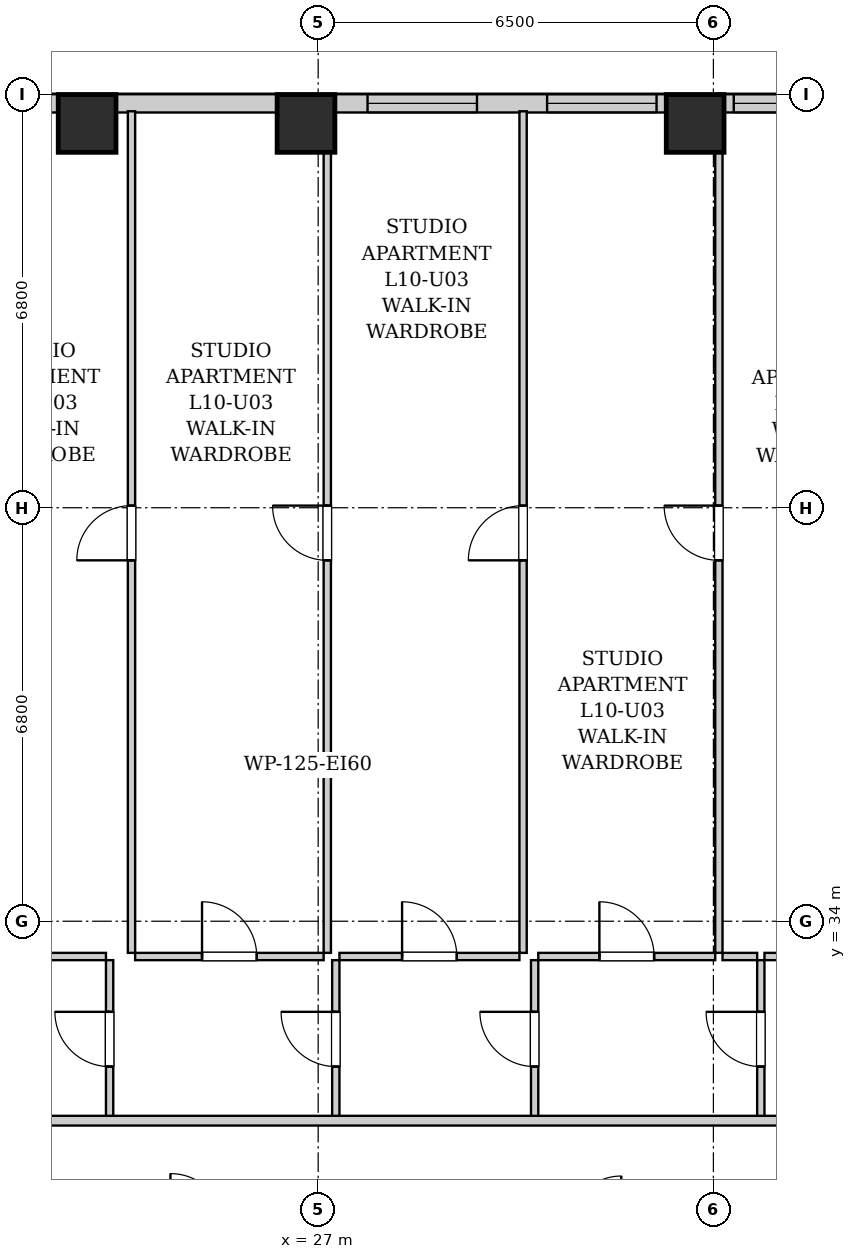
"""IFC4 building model, lengths in metres.
Left out: names, types, materials, properties, quantities, classifications, styles, units other than length and angle.
Written with IfcOpenShell. Run it as: python <this file> out.ifc"""

import sys

from ifc_helpers import new_model, si_unit, direction, frame, frame_2d, origin, origin_2d, place, context, subcontext, project, spatial, rectangle, extrude, element, fill, save


model = new_model("IFC4")
c1 = context("Model", 3, precision=1e-05, world=origin(), true_north=direction((0.0, 1.0)))
c2 = subcontext(c1, "Body", "Model", "MODEL_VIEW")
j1 = project(units=[si_unit("LENGTHUNIT", "METRE"), si_unit("PLANEANGLEUNIT", "RADIAN")], contexts=[c1])
p1 = place(None, origin())
s1 = spatial("IfcSite", under=j1, at=p1, CompositionType="ELEMENT")
p2 = place(p1, origin())
s2 = spatial("IfcBuilding", under=s1, at=p2, CompositionType="ELEMENT")
p3 = place(p2, frame((0.0, 0.0, 41.8)))
s3 = spatial("IfcBuildingStorey", under=s2, at=p3, CompositionType="ELEMENT", Elevation=41.8)
for number, where, z_axis, x_axis in (
    (1, (23.2, 47.12, 0.0), (0.0, 0.0, 1.0), (1.0, 0.0, 0.0)),
    (2, (26.8, 47.12, 0.0), (0.0, 0.0, 1.0), (1.0, 0.0, 0.0)),
    (3, (33.2, 47.12, 0.0), (0.0, 0.0, 1.0), (1.0, 0.0, 0.0)),
):
    element("IfcColumn", number, at=place(p3, frame(where, z_axis=z_axis, x_axis=x_axis)), inside=s3, PredefinedType="COLUMN", context=c2, shape_type="SweptSolid", body=[
        extrude(rectangle(XDim=0.95, YDim=0.95, at=origin_2d()), origin(), (0.0, 0.0, 1.0), 3.2),
    ])
p4 = place(p3, frame((10.0, 47.45, 0.0), z_axis=(0.0, 0.0, 1.0), x_axis=(1.0, 0.0, 0.0)))
e4 = element("IfcWall", 4, at=p4, inside=s3, PredefinedType="SOLIDWALL", context=c2, shape_type="SweptSolid", body=[
    extrude(rectangle(XDim=25.7, YDim=0.3, at=frame_2d((12.85, 0.0))), origin(), (0.0, 0.0, 1.0), 1.975),
])
p5 = place(p4, frame((1.73, 0.0, 0.55)))
e5 = element("IfcOpeningElement", 5, at=p5, cuts=e4, PredefinedType="OPENING", context=c2, shape_type="SweptSolid", body=[
    extrude(rectangle(XDim=1.8, YDim=1.2, at=frame_2d((0.9, 0.6))), frame((0.0, 0.16, 0.0), z_axis=(0.0, -1.0, 0.0), x_axis=(1.0, 0.0, 0.0)), (0.0, 0.0, 1.0), 0.32),
])
p6 = place(p4, frame((4.961, 0.0, 0.55)))
e6 = element("IfcOpeningElement", 6, at=p6, cuts=e4, PredefinedType="OPENING", context=c2, shape_type="SweptSolid", body=[
    extrude(rectangle(XDim=1.8, YDim=1.2, at=frame_2d((0.9, 0.6))), frame((0.0, 0.16, 0.0), z_axis=(0.0, -1.0, 0.0), x_axis=(1.0, 0.0, 0.0)), (0.0, 0.0, 1.0), 0.32),
])
p7 = place(p4, frame((8.435, 0.0, 0.55)))
e7 = element("IfcOpeningElement", 7, at=p7, cuts=e4, PredefinedType="OPENING", context=c2, shape_type="SweptSolid", body=[
    extrude(rectangle(XDim=1.8, YDim=1.2, at=frame_2d((0.9, 0.6))), frame((0.0, 0.16, 0.0), z_axis=(0.0, -1.0, 0.0), x_axis=(1.0, 0.0, 0.0)), (0.0, 0.0, 1.0), 0.32),
])
p8 = place(p4, frame((11.15, 0.0, 0.55)))
e8 = element("IfcOpeningElement", 8, at=p8, cuts=e4, PredefinedType="OPENING", context=c2, shape_type="SweptSolid", body=[
    extrude(rectangle(XDim=1.35, YDim=1.2, at=frame_2d((0.675, 0.6))), frame((0.0, 0.16, 0.0), z_axis=(0.0, -1.0, 0.0), x_axis=(1.0, 0.0, 0.0)), (0.0, 0.0, 1.0), 0.32),
])
p9 = place(p4, frame((17.812, 0.0, 0.55)))
e9 = element("IfcOpeningElement", 9, at=p9, cuts=e4, PredefinedType="OPENING", context=c2, shape_type="SweptSolid", body=[
    extrude(rectangle(XDim=1.8, YDim=1.2, at=frame_2d((0.9, 0.6))), frame((0.0, 0.16, 0.0), z_axis=(0.0, -1.0, 0.0), x_axis=(1.0, 0.0, 0.0)), (0.0, 0.0, 1.0), 0.32),
])
p10 = place(p4, frame((20.765, 0.0, 0.55)))
e10 = element("IfcOpeningElement", 10, at=p10, cuts=e4, PredefinedType="OPENING", context=c2, shape_type="SweptSolid", body=[
    extrude(rectangle(XDim=1.8, YDim=1.2, at=frame_2d((0.9, 0.6))), frame((0.0, 0.16, 0.0), z_axis=(0.0, -1.0, 0.0), x_axis=(1.0, 0.0, 0.0)), (0.0, 0.0, 1.0), 0.32),
])
p11 = place(p4, frame((23.835, 0.0, 0.55)))
e11 = element("IfcOpeningElement", 11, at=p11, cuts=e4, PredefinedType="OPENING", context=c2, shape_type="SweptSolid", body=[
    extrude(rectangle(XDim=1.35, YDim=1.2, at=frame_2d((0.675, 0.6))), frame((0.0, 0.16, 0.0), z_axis=(0.0, -1.0, 0.0), x_axis=(1.0, 0.0, 0.0)), (0.0, 0.0, 1.0), 0.32),
])
p12 = place(p3, frame((23.57, 30.76, 0.0), z_axis=(0.0, 0.0, 1.0), x_axis=(0.0, 1.0, 0.0)))
e12 = element("IfcWall", 12, at=p12, inside=s3, PredefinedType="PARTITIONING", context=c2, shape_type="SweptSolid", body=[
    extrude(rectangle(XDim=2.6, YDim=0.12, at=frame_2d((1.3, 0.0))), origin(), (0.0, 0.0, 1.0), 2.94),
])
p13 = place(p12, frame((0.85, 0.0, 0.0)))
e13 = element("IfcOpeningElement", 13, at=p13, cuts=e12, PredefinedType="OPENING", context=c2, shape_type="SweptSolid", body=[
    extrude(rectangle(XDim=0.9, YDim=2.05, at=frame_2d((0.45, 1.025))), frame((0.0, 0.07, 0.0), z_axis=(0.0, -1.0, 0.0), x_axis=(1.0, 0.0, 0.0)), (0.0, 0.0, 1.0), 0.14),
])
p14 = place(p3, frame((20.77, 33.42, 0.0), z_axis=(0.0, 0.0, 1.0), x_axis=(1.0, 0.0, 0.0)))
e14 = element("IfcWall", 14, at=p14, inside=s3, PredefinedType="PARTITIONING", context=c2, shape_type="SweptSolid", body=[
    extrude(rectangle(XDim=2.74, YDim=0.12, at=frame_2d((1.37, 0.0))), origin(), (0.0, 0.0, 1.0), 2.94),
])
p15 = place(p14, frame((0.92, 0.0, 0.0)))
e15 = element("IfcOpeningElement", 15, at=p15, cuts=e14, PredefinedType="OPENING", context=c2, shape_type="SweptSolid", body=[
    extrude(rectangle(XDim=0.9, YDim=2.05, at=frame_2d((0.45, 1.025))), frame((0.0, 0.07, 0.0), z_axis=(0.0, -1.0, 0.0), x_axis=(1.0, 0.0, 0.0)), (0.0, 0.0, 1.0), 0.14),
])
p16 = place(p3, frame((27.29, 30.76, 0.0), z_axis=(0.0, 0.0, 1.0), x_axis=(0.0, 1.0, 0.0)))
e16 = element("IfcWall", 16, at=p16, inside=s3, PredefinedType="PARTITIONING", context=c2, shape_type="SweptSolid", body=[
    extrude(rectangle(XDim=2.6, YDim=0.12, at=frame_2d((1.3, 0.0))), origin(), (0.0, 0.0, 1.0), 2.94),
])
p17 = place(p16, frame((0.85, 0.0, 0.0)))
e17 = element("IfcOpeningElement", 17, at=p17, cuts=e16, PredefinedType="OPENING", context=c2, shape_type="SweptSolid", body=[
    extrude(rectangle(XDim=0.9, YDim=2.05, at=frame_2d((0.45, 1.025))), frame((0.0, 0.07, 0.0), z_axis=(0.0, -1.0, 0.0), x_axis=(1.0, 0.0, 0.0)), (0.0, 0.0, 1.0), 0.14),
])
p18 = place(p3, frame((23.99, 33.42, 0.0), z_axis=(0.0, 0.0, 1.0), x_axis=(1.0, 0.0, 0.0)))
e18 = element("IfcWall", 18, at=p18, inside=s3, PredefinedType="PARTITIONING", context=c2, shape_type="SweptSolid", body=[
    extrude(rectangle(XDim=3.1, YDim=0.12, at=frame_2d((1.55, 0.0))), origin(), (0.0, 0.0, 1.0), 2.94),
])
p19 = place(p18, frame((1.1, 0.0, 0.0)))
e19 = element("IfcOpeningElement", 19, at=p19, cuts=e18, PredefinedType="OPENING", context=c2, shape_type="SweptSolid", body=[
    extrude(rectangle(XDim=0.9, YDim=2.05, at=frame_2d((0.45, 1.025))), frame((0.0, 0.07, 0.0), z_axis=(0.0, -1.0, 0.0), x_axis=(1.0, 0.0, 0.0)), (0.0, 0.0, 1.0), 0.14),
])
p20 = place(p3, frame((30.56, 30.76, 0.0), z_axis=(0.0, 0.0, 1.0), x_axis=(0.0, 1.0, 0.0)))
e20 = element("IfcWall", 20, at=p20, inside=s3, PredefinedType="PARTITIONING", context=c2, shape_type="SweptSolid", body=[
    extrude(rectangle(XDim=2.6, YDim=0.12, at=frame_2d((1.3, 0.0))), origin(), (0.0, 0.0, 1.0), 2.94),
])
p21 = place(p20, frame((0.85, 0.0, 0.0)))
e21 = element("IfcOpeningElement", 21, at=p21, cuts=e20, PredefinedType="OPENING", context=c2, shape_type="SweptSolid", body=[
    extrude(rectangle(XDim=0.9, YDim=2.05, at=frame_2d((0.45, 1.025))), frame((0.0, 0.07, 0.0), z_axis=(0.0, -1.0, 0.0), x_axis=(1.0, 0.0, 0.0)), (0.0, 0.0, 1.0), 0.14),
])
p22 = place(p3, frame((27.35, 33.42, 0.0), z_axis=(0.0, 0.0, 1.0), x_axis=(1.0, 0.0, 0.0)))
e22 = element("IfcWall", 22, at=p22, inside=s3, PredefinedType="PARTITIONING", context=c2, shape_type="SweptSolid", body=[
    extrude(rectangle(XDim=2.96, YDim=0.12, at=frame_2d((1.48, 0.0))), origin(), (0.0, 0.0, 1.0), 2.94),
])
p23 = place(p22, frame((1.03, 0.0, 0.0)))
e23 = element("IfcOpeningElement", 23, at=p23, cuts=e22, PredefinedType="OPENING", context=c2, shape_type="SweptSolid", body=[
    extrude(rectangle(XDim=0.9, YDim=2.05, at=frame_2d((0.45, 1.025))), frame((0.0, 0.07, 0.0), z_axis=(0.0, -1.0, 0.0), x_axis=(1.0, 0.0, 0.0)), (0.0, 0.0, 1.0), 0.14),
])
p24 = place(p3, frame((34.28, 30.76, 0.0), z_axis=(0.0, 0.0, 1.0), x_axis=(0.0, 1.0, 0.0)))
e24 = element("IfcWall", 24, at=p24, inside=s3, PredefinedType="PARTITIONING", context=c2, shape_type="SweptSolid", body=[
    extrude(rectangle(XDim=2.6, YDim=0.12, at=frame_2d((1.3, 0.0))), origin(), (0.0, 0.0, 1.0), 2.94),
])
p25 = place(p24, frame((0.85, 0.0, 0.0)))
e25 = element("IfcOpeningElement", 25, at=p25, cuts=e24, PredefinedType="OPENING", context=c2, shape_type="SweptSolid", body=[
    extrude(rectangle(XDim=0.9, YDim=2.05, at=frame_2d((0.45, 1.025))), frame((0.0, 0.07, 0.0), z_axis=(0.0, -1.0, 0.0), x_axis=(1.0, 0.0, 0.0)), (0.0, 0.0, 1.0), 0.14),
])
p26 = place(p3, frame((30.62, 33.42, 0.0), z_axis=(0.0, 0.0, 1.0), x_axis=(1.0, 0.0, 0.0)))
e26 = element("IfcWall", 26, at=p26, inside=s3, PredefinedType="PARTITIONING", context=c2, shape_type="SweptSolid", body=[
    extrude(rectangle(XDim=2.91, YDim=0.12, at=frame_2d((1.455, 0.0))), origin(), (0.0, 0.0, 1.0), 2.94),
])
p27 = place(p26, frame((1.005, 0.0, 0.0)))
e27 = element("IfcOpeningElement", 27, at=p27, cuts=e26, PredefinedType="OPENING", context=c2, shape_type="SweptSolid", body=[
    extrude(rectangle(XDim=0.9, YDim=2.05, at=frame_2d((0.45, 1.025))), frame((0.0, 0.07, 0.0), z_axis=(0.0, -1.0, 0.0), x_axis=(1.0, 0.0, 0.0)), (0.0, 0.0, 1.0), 0.14),
])
p28 = place(p3, frame((33.65, 33.42, 0.0), z_axis=(0.0, 0.0, 1.0), x_axis=(1.0, 0.0, 0.0)))
e28 = element("IfcWall", 28, at=p28, inside=s3, PredefinedType="PARTITIONING", context=c2, shape_type="SweptSolid", body=[
    extrude(rectangle(XDim=0.57, YDim=0.12, at=frame_2d((0.285, 0.0))), origin(), (0.0, 0.0, 1.0), 2.94),
])
p29 = place(p3, frame((34.34, 33.42, 0.0), z_axis=(0.0, 0.0, 1.0), x_axis=(1.0, 0.0, 0.0)))
e29 = element("IfcWall", 29, at=p29, inside=s3, PredefinedType="PARTITIONING", context=c2, shape_type="SweptSolid", body=[
    extrude(rectangle(XDim=2.41, YDim=0.12, at=frame_2d((1.205, 0.0))), origin(), (0.0, 0.0, 1.0), 2.94),
])
p30 = place(p29, frame((0.755, 0.0, 0.0)))
e30 = element("IfcOpeningElement", 30, at=p30, cuts=e29, PredefinedType="OPENING", context=c2, shape_type="SweptSolid", body=[
    extrude(rectangle(XDim=0.9, YDim=2.05, at=frame_2d((0.45, 1.025))), frame((0.0, 0.07, 0.0), z_axis=(0.0, -1.0, 0.0), x_axis=(1.0, 0.0, 0.0)), (0.0, 0.0, 1.0), 0.14),
])
p31 = place(p3, frame((23.93, 33.48, 0.0), z_axis=(0.0, 0.0, 1.0), x_axis=(0.0, 1.0, 0.0)))
e31 = element("IfcWall", 31, at=p31, inside=s3, PredefinedType="PARTITIONING", context=c2, shape_type="SweptSolid", body=[
    extrude(rectangle(XDim=13.84, YDim=0.12, at=frame_2d((6.92, 0.0))), origin(), (0.0, 0.0, 1.0), 2.94),
])
p32 = place(p31, frame((6.455, 0.0, 0.0)))
e32 = element("IfcOpeningElement", 32, at=p32, cuts=e31, PredefinedType="OPENING", context=c2, shape_type="SweptSolid", body=[
    extrude(rectangle(XDim=0.9, YDim=2.05, at=frame_2d((0.45, 1.025))), frame((0.0, 0.07, 0.0), z_axis=(0.0, -1.0, 0.0), x_axis=(1.0, 0.0, 0.0)), (0.0, 0.0, 1.0), 0.14),
])
p33 = place(p3, frame((27.15, 33.48, 0.0), z_axis=(0.0, 0.0, 1.0), x_axis=(0.0, 1.0, 0.0)))
e33 = element("IfcWall", 33, at=p33, inside=s3, PredefinedType="PARTITIONING", context=c2, shape_type="SweptSolid", body=[
    extrude(rectangle(XDim=13.84, YDim=0.12, at=frame_2d((6.92, 0.0))), origin(), (0.0, 0.0, 1.0), 2.94),
])
p34 = place(p33, frame((6.455, 0.0, 0.0)))
e34 = element("IfcOpeningElement", 34, at=p34, cuts=e33, PredefinedType="OPENING", context=c2, shape_type="SweptSolid", body=[
    extrude(rectangle(XDim=0.9, YDim=2.05, at=frame_2d((0.45, 1.025))), frame((0.0, 0.07, 0.0), z_axis=(0.0, -1.0, 0.0), x_axis=(1.0, 0.0, 0.0)), (0.0, 0.0, 1.0), 0.14),
])
p35 = place(p3, frame((30.37, 33.48, 0.0), z_axis=(0.0, 0.0, 1.0), x_axis=(0.0, 1.0, 0.0)))
e35 = element("IfcWall", 35, at=p35, inside=s3, PredefinedType="PARTITIONING", context=c2, shape_type="SweptSolid", body=[
    extrude(rectangle(XDim=13.84, YDim=0.12, at=frame_2d((6.92, 0.0))), origin(), (0.0, 0.0, 1.0), 2.94),
])
p36 = place(p35, frame((6.455, 0.0, 0.0)))
e36 = element("IfcOpeningElement", 36, at=p36, cuts=e35, PredefinedType="OPENING", context=c2, shape_type="SweptSolid", body=[
    extrude(rectangle(XDim=0.9, YDim=2.05, at=frame_2d((0.45, 1.025))), frame((0.0, 0.07, 0.0), z_axis=(0.0, -1.0, 0.0), x_axis=(1.0, 0.0, 0.0)), (0.0, 0.0, 1.0), 0.14),
])
p37 = place(p3, frame((33.59, 33.48, 0.0), z_axis=(0.0, 0.0, 1.0), x_axis=(0.0, 1.0, 0.0)))
e37 = element("IfcWall", 37, at=p37, inside=s3, PredefinedType="PARTITIONING", context=c2, shape_type="SweptSolid", body=[
    extrude(rectangle(XDim=13.84, YDim=0.12, at=frame_2d((6.92, 0.0))), origin(), (0.0, 0.0, 1.0), 2.94),
])
p38 = place(p37, frame((6.455, 0.0, 0.0)))
e38 = element("IfcOpeningElement", 38, at=p38, cuts=e37, PredefinedType="OPENING", context=c2, shape_type="SweptSolid", body=[
    extrude(rectangle(XDim=0.9, YDim=2.05, at=frame_2d((0.45, 1.025))), frame((0.0, 0.07, 0.0), z_axis=(0.0, -1.0, 0.0), x_axis=(1.0, 0.0, 0.0)), (0.0, 0.0, 1.0), 0.14),
])
p39 = place(p3, frame((10.05, 30.72, 0.0), z_axis=(0.0, 0.0, 1.0), x_axis=(1.0, 0.0, 0.0)))
e39 = element("IfcWall", 39, at=p39, inside=s3, PredefinedType="PARTITIONING", context=c2, shape_type="SweptSolid", body=[
    extrude(rectangle(XDim=33.9, YDim=0.16, at=frame_2d((16.95, 0.0))), origin(), (0.0, 0.0, 1.0), 2.94),
])
p40 = place(p39, frame((4.035, 0.0, 0.0)))
e40 = element("IfcOpeningElement", 40, at=p40, cuts=e39, PredefinedType="OPENING", context=c2, shape_type="SweptSolid", body=[
    extrude(rectangle(XDim=0.95, YDim=2.1, at=frame_2d((0.475, 1.05))), frame((0.0, 0.09, 0.0), z_axis=(0.0, -1.0, 0.0), x_axis=(1.0, 0.0, 0.0)), (0.0, 0.0, 1.0), 0.18),
])
p41 = place(p13, origin())
e41 = element("IfcDoor", 41, at=p41, inside=s3, OperationType="SINGLE_SWING_RIGHT", PredefinedType="DOOR", context=c2, shape_type="SweptSolid", body=[
    extrude(rectangle(XDim=0.9, YDim=2.05, at=frame_2d((0.45, 1.025))), frame((0.0, 0.025, 0.0), z_axis=(0.0, -1.0, 0.0), x_axis=(1.0, 0.0, 0.0)), (0.0, 0.0, 1.0), 0.05),
])
fill(e13, e41)
p42 = place(p17, origin())
e42 = element("IfcDoor", 42, at=p42, inside=s3, OperationType="SINGLE_SWING_RIGHT", PredefinedType="DOOR", context=c2, shape_type="SweptSolid", body=[
    extrude(rectangle(XDim=0.9, YDim=2.05, at=frame_2d((0.45, 1.025))), frame((0.0, 0.025, 0.0), z_axis=(0.0, -1.0, 0.0), x_axis=(1.0, 0.0, 0.0)), (0.0, 0.0, 1.0), 0.05),
])
fill(e17, e42)
p43 = place(p19, origin())
e43 = element("IfcDoor", 43, at=p43, inside=s3, OperationType="SINGLE_SWING_LEFT", PredefinedType="DOOR", context=c2, shape_type="SweptSolid", body=[
    extrude(rectangle(XDim=0.9, YDim=2.05, at=frame_2d((0.45, 1.025))), frame((0.0, 0.025, 0.0), z_axis=(0.0, -1.0, 0.0), x_axis=(1.0, 0.0, 0.0)), (0.0, 0.0, 1.0), 0.05),
])
fill(e19, e43)
p44 = place(p21, origin())
e44 = element("IfcDoor", 44, at=p44, inside=s3, OperationType="SINGLE_SWING_RIGHT", PredefinedType="DOOR", context=c2, shape_type="SweptSolid", body=[
    extrude(rectangle(XDim=0.9, YDim=2.05, at=frame_2d((0.45, 1.025))), frame((0.0, 0.025, 0.0), z_axis=(0.0, -1.0, 0.0), x_axis=(1.0, 0.0, 0.0)), (0.0, 0.0, 1.0), 0.05),
])
fill(e21, e44)
p45 = place(p23, origin())
e45 = element("IfcDoor", 45, at=p45, inside=s3, OperationType="SINGLE_SWING_LEFT", PredefinedType="DOOR", context=c2, shape_type="SweptSolid", body=[
    extrude(rectangle(XDim=0.9, YDim=2.05, at=frame_2d((0.45, 1.025))), frame((0.0, 0.025, 0.0), z_axis=(0.0, -1.0, 0.0), x_axis=(1.0, 0.0, 0.0)), (0.0, 0.0, 1.0), 0.05),
])
fill(e23, e45)
p46 = place(p25, origin())
e46 = element("IfcDoor", 46, at=p46, inside=s3, OperationType="SINGLE_SWING_RIGHT", PredefinedType="DOOR", context=c2, shape_type="SweptSolid", body=[
    extrude(rectangle(XDim=0.9, YDim=2.05, at=frame_2d((0.45, 1.025))), frame((0.0, 0.025, 0.0), z_axis=(0.0, -1.0, 0.0), x_axis=(1.0, 0.0, 0.0)), (0.0, 0.0, 1.0), 0.05),
])
fill(e25, e46)
p47 = place(p27, origin())
e47 = element("IfcDoor", 47, at=p47, inside=s3, OperationType="SINGLE_SWING_LEFT", PredefinedType="DOOR", context=c2, shape_type="SweptSolid", body=[
    extrude(rectangle(XDim=0.9, YDim=2.05, at=frame_2d((0.45, 1.025))), frame((0.0, 0.025, 0.0), z_axis=(0.0, -1.0, 0.0), x_axis=(1.0, 0.0, 0.0)), (0.0, 0.0, 1.0), 0.05),
])
fill(e27, e47)
p48 = place(p32, origin())
e48 = element("IfcDoor", 48, at=p48, inside=s3, OperationType="SINGLE_SWING_LEFT", PredefinedType="DOOR", context=c2, shape_type="SweptSolid", body=[
    extrude(rectangle(XDim=0.9, YDim=2.05, at=frame_2d((0.45, 1.025))), frame((0.0, 0.025, 0.0), z_axis=(0.0, -1.0, 0.0), x_axis=(1.0, 0.0, 0.0)), (0.0, 0.0, 1.0), 0.05),
])
fill(e32, e48)
p49 = place(p34, origin())
e49 = element("IfcDoor", 49, at=p49, inside=s3, OperationType="SINGLE_SWING_RIGHT", PredefinedType="DOOR", context=c2, shape_type="SweptSolid", body=[
    extrude(rectangle(XDim=0.9, YDim=2.05, at=frame_2d((0.45, 1.025))), frame((0.0, 0.025, 0.0), z_axis=(0.0, -1.0, 0.0), x_axis=(1.0, 0.0, 0.0)), (0.0, 0.0, 1.0), 0.05),
])
fill(e34, e49)
p50 = place(p36, origin())
e50 = element("IfcDoor", 50, at=p50, inside=s3, OperationType="SINGLE_SWING_LEFT", PredefinedType="DOOR", context=c2, shape_type="SweptSolid", body=[
    extrude(rectangle(XDim=0.9, YDim=2.05, at=frame_2d((0.45, 1.025))), frame((0.0, 0.025, 0.0), z_axis=(0.0, -1.0, 0.0), x_axis=(1.0, 0.0, 0.0)), (0.0, 0.0, 1.0), 0.05),
])
fill(e36, e50)
p51 = place(p38, origin())
e51 = element("IfcDoor", 51, at=p51, inside=s3, OperationType="SINGLE_SWING_RIGHT", PredefinedType="DOOR", context=c2, shape_type="SweptSolid", body=[
    extrude(rectangle(XDim=0.9, YDim=2.05, at=frame_2d((0.45, 1.025))), frame((0.0, 0.025, 0.0), z_axis=(0.0, -1.0, 0.0), x_axis=(1.0, 0.0, 0.0)), (0.0, 0.0, 1.0), 0.05),
])
fill(e38, e51)
p52 = place(p9, origin())
e52 = element("IfcWindow", 52, at=p52, inside=s3, PartitioningType="DOUBLE_PANEL_VERTICAL", PredefinedType="WINDOW", context=c2, shape_type="SweptSolid", body=[
    extrude(rectangle(XDim=1.8, YDim=1.2, at=frame_2d((0.9, 0.6))), frame((0.0, 0.03, 0.0), z_axis=(0.0, -1.0, 0.0), x_axis=(1.0, 0.0, 0.0)), (0.0, 0.0, 1.0), 0.06),
])
fill(e9, e52)
p53 = place(p10, origin())
e53 = element("IfcWindow", 53, at=p53, inside=s3, PartitioningType="DOUBLE_PANEL_VERTICAL", PredefinedType="WINDOW", context=c2, shape_type="SweptSolid", body=[
    extrude(rectangle(XDim=1.8, YDim=1.2, at=frame_2d((0.9, 0.6))), frame((0.0, 0.03, 0.0), z_axis=(0.0, -1.0, 0.0), x_axis=(1.0, 0.0, 0.0)), (0.0, 0.0, 1.0), 0.06),
])
fill(e10, e53)
p54 = place(p11, origin())
e54 = element("IfcWindow", 54, at=p54, inside=s3, PartitioningType="SINGLE_PANEL", PredefinedType="WINDOW", context=c2, shape_type="SweptSolid", body=[
    extrude(rectangle(XDim=1.35, YDim=1.2, at=frame_2d((0.675, 0.6))), frame((0.0, 0.03, 0.0), z_axis=(0.0, -1.0, 0.0), x_axis=(1.0, 0.0, 0.0)), (0.0, 0.0, 1.0), 0.06),
])
fill(e11, e54)
save(model, sys.argv[1])
